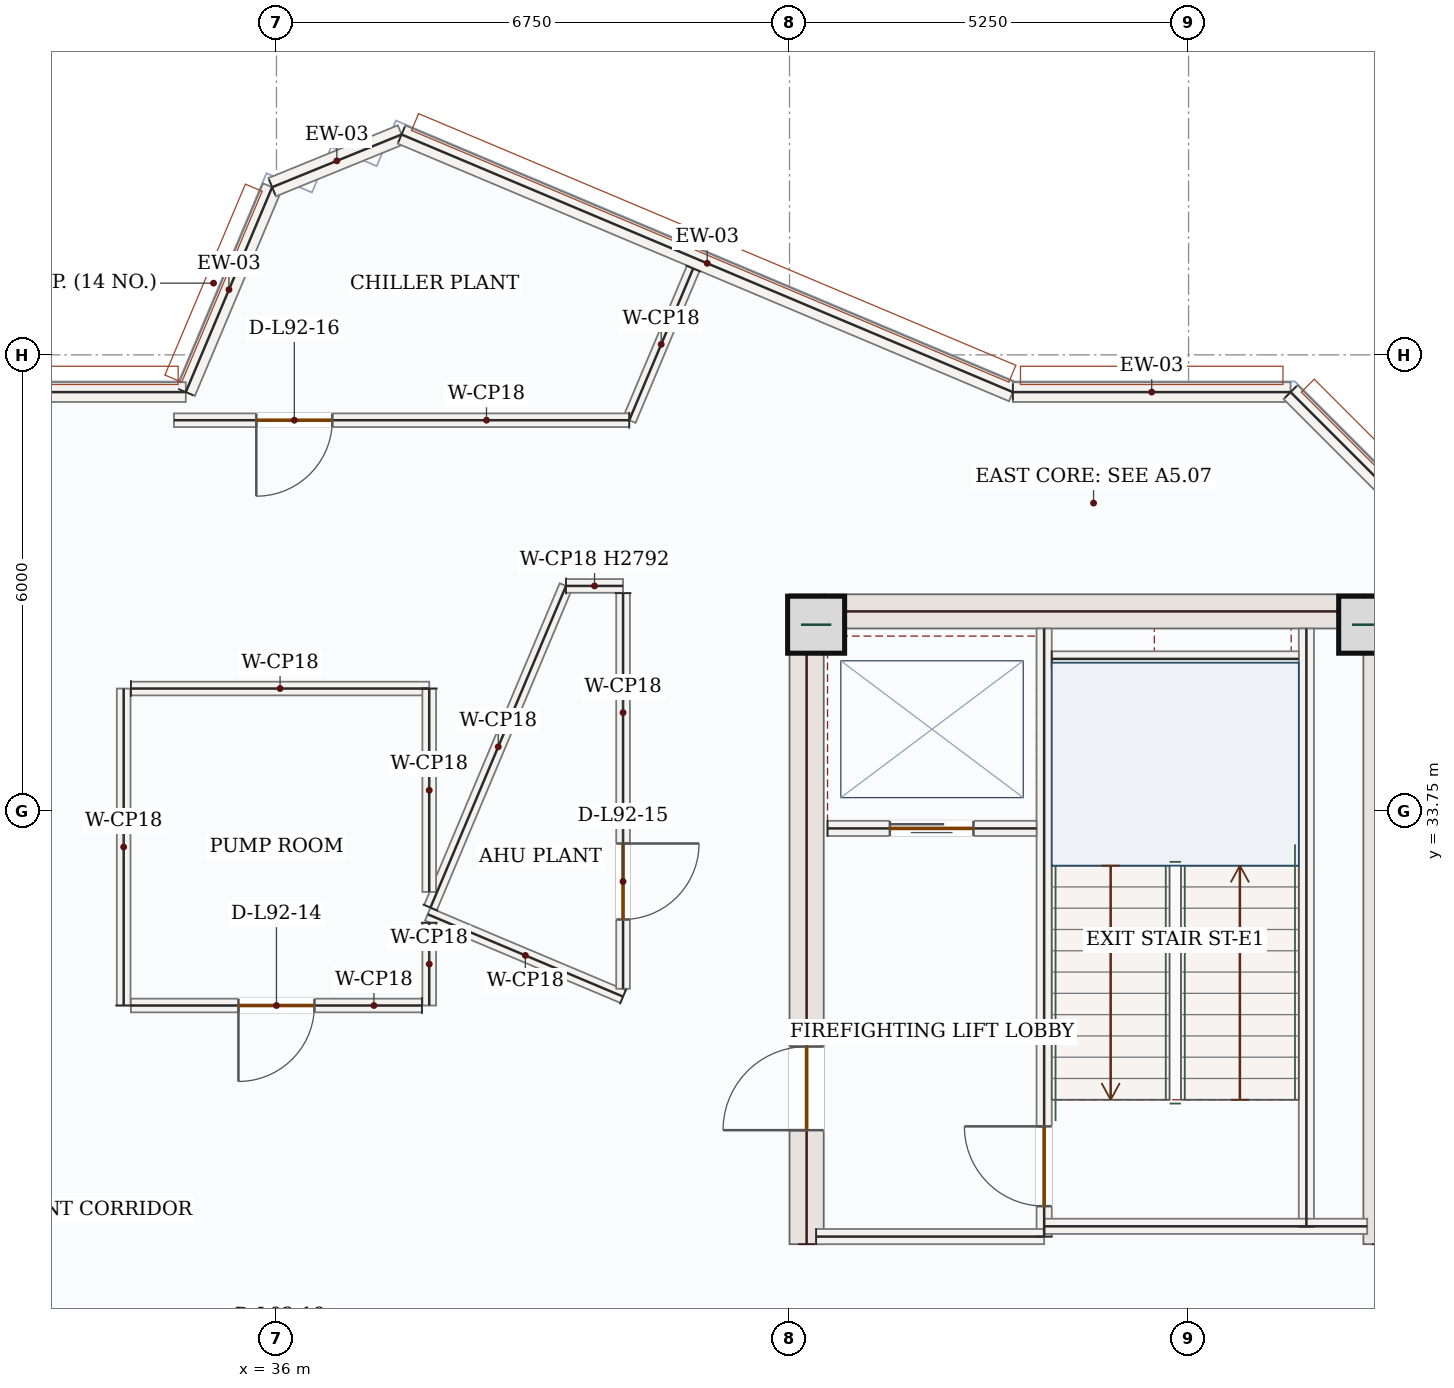
"""IFC4 building model, lengths in metres.
Left out: names, types, materials, properties, quantities, classifications, styles, units other than length and angle.
Written with IfcOpenShell. Run it as: python <this file> out.ifc"""

import sys

from ifc_helpers import new_model, si_unit, direction, frame, frame_2d, origin, origin_2d, place, context, subcontext, project, spatial, rectangle, extrude, source, transform, mapped, element, fill, save


model = new_model("IFC4")
c1 = context("Model", 3, precision=1e-05, world=origin(), true_north=direction((0.0, 1.0)))
c2 = subcontext(c1, "Body", "Model", "MODEL_VIEW")
j1 = project(units=[si_unit("LENGTHUNIT", "METRE"), si_unit("PLANEANGLEUNIT", "RADIAN")], contexts=[c1])
p1 = place(None, origin())
s1 = spatial("IfcSite", under=j1, at=p1, CompositionType="ELEMENT")
p2 = place(p1, origin())
s2 = spatial("IfcBuilding", under=s1, at=p2, CompositionType="ELEMENT")
p3 = place(p2, frame((0.0, 0.0, 379.65)))
s3 = spatial("IfcBuildingStorey", under=s2, at=p3, CompositionType="ELEMENT", Elevation=379.65)
p4 = place(p3, frame((42.975, 28.05, 0.0), z_axis=(0.0, 0.0, 1.0), x_axis=(0.0, 1.0, 0.0)))
e1 = element("IfcWall", 1, at=p4, inside=s3, PredefinedType="SHEAR", context=c2, shape_type="SweptSolid", body=[
    extrude(rectangle(XDim=8.55, YDim=0.45, at=frame_2d((4.275, 0.0))), origin(), (0.0, 0.0, 1.0), 3.95),
])
p5 = place(p4, frame((1.5, 0.0, 0.0)))
e2 = element("IfcOpeningElement", 2, at=p5, cuts=e1, PredefinedType="OPENING", context=c2, shape_type="SweptSolid", body=[
    extrude(rectangle(XDim=1.1, YDim=2.2, at=frame_2d((0.55, 1.1))), frame((0.0, 0.235, 0.0), z_axis=(0.0, -1.0, 0.0), x_axis=(1.0, 0.0, 0.0)), (0.0, 0.0, 1.0), 0.47),
])
m1 = source(origin(), c2, "Body", "SweptSolid", [
    extrude(rectangle(XDim=8.55, YDim=0.45, at=frame_2d((4.275, 0.0))), origin(), (0.0, 0.0, 1.0), 3.95),
])
p6 = place(p3, frame((50.525, 28.05, 0.0), z_axis=(0.0, 0.0, 1.0), x_axis=(0.0, 1.0, 0.0)))
e3 = element("IfcWall", 3, at=p6, inside=s3, PredefinedType="SHEAR", context=c2, shape_type="MappedRepresentation", body=[
    mapped(m1, transform((0.0, 0.0, 0.0), x_axis=(1.0, 0.0, 0.0), y_axis=(0.0, 1.0, 0.0), z_axis=(0.0, 0.0, 1.0), scale=1.0)),
])
m2 = source(origin(), c2, "Body", "SweptSolid", [
    extrude(rectangle(XDim=7.1, YDim=0.45, at=frame_2d((3.55, 0.0))), origin(), (0.0, 0.0, 1.0), 3.95),
])
p7 = place(p3, frame((43.2, 36.375, 0.0), z_axis=(0.0, 0.0, 1.0), x_axis=(1.0, 0.0, 0.0)))
e4 = element("IfcWall", 4, at=p7, inside=s3, PredefinedType="SHEAR", context=c2, shape_type="MappedRepresentation", body=[
    mapped(m2, transform((0.0, 0.0, 0.0), x_axis=(1.0, 0.0, 0.0), y_axis=(0.0, 1.0, 0.0), z_axis=(0.0, 0.0, 1.0), scale=1.0)),
])
m3 = source(origin(), c2, "Body", "SweptSolid", [
    extrude(rectangle(XDim=0.75, YDim=0.75, at=origin_2d()), origin(), (0.0, 0.0, 1.0), 4.2),
])
for number, where, z_axis, x_axis in (
    (5, (43.1, 36.2, 0.0), (0.0, 0.0, 1.0), (1.0, 0.0, 0.0)),
    (6, (50.35, 36.2, 0.0), (0.0, 0.0, 1.0), (1.0, 0.0, 0.0)),
):
    element("IfcColumn", number, at=place(p3, frame(where, z_axis=z_axis, x_axis=x_axis)), inside=s3, PredefinedType="COLUMN", context=c2, shape_type="MappedRepresentation", body=[
        mapped(m3, transform((0.0, 0.0, 0.0), x_axis=(1.0, 0.0, 0.0), y_axis=(0.0, 1.0, 0.0), z_axis=(0.0, 0.0, 1.0), scale=1.0)),
    ])
m4 = source(origin(), c2, "Body", "SweptSolid", [
    extrude(rectangle(XDim=2.925, YDim=0.26, at=frame_2d((1.463, 0.0))), origin(), (0.0, 0.0, 1.0), 3.95),
])
p8 = place(p3, frame((34.807, 39.26, 0.0), z_axis=(0.0, 0.0, 1.0), x_axis=(0.388321883953, 0.921523800259, 0.0)))
e7 = element("IfcWall", 7, at=p8, inside=s3, PredefinedType="SOLIDWALL", context=c2, shape_type="MappedRepresentation", body=[
    mapped(m4, transform((0.0, 0.0, 0.0), x_axis=(1.0, 0.0, 0.0), y_axis=(0.0, 1.0, 0.0), z_axis=(0.0, 0.0, 1.0), scale=1.0)),
])
m5 = source(origin(), c2, "Body", "SweptSolid", [
    extrude(rectangle(XDim=1.839, YDim=0.26, at=frame_2d((0.919, 0.0))), origin(), (0.0, 0.0, 1.0), 3.95),
])
p9 = place(p3, frame((35.943, 41.956, 0.0), z_axis=(0.0, 0.0, 1.0), x_axis=(0.926216039781, 0.376993166586, 0.0)))
e8 = element("IfcWall", 8, at=p9, inside=s3, PredefinedType="SOLIDWALL", context=c2, shape_type="MappedRepresentation", body=[
    mapped(m5, transform((0.0, 0.0, 0.0), x_axis=(1.0, 0.0, 0.0), y_axis=(0.0, 1.0, 0.0), z_axis=(0.0, 0.0, 1.0), scale=1.0)),
])
m6 = source(origin(), c2, "Body", "SweptSolid", [
    extrude(rectangle(XDim=8.727, YDim=0.26, at=frame_2d((4.364, 0.0))), origin(), (0.0, 0.0, 1.0), 3.95),
])
p10 = place(p3, frame((37.646, 42.649, 0.0), z_axis=(0.0, 0.0, 1.0), x_axis=(0.921524227272, -0.38832087061, 0.0)))
e9 = element("IfcWall", 9, at=p10, inside=s3, PredefinedType="SOLIDWALL", context=c2, shape_type="MappedRepresentation", body=[
    mapped(m6, transform((0.0, 0.0, 0.0), x_axis=(1.0, 0.0, 0.0), y_axis=(0.0, 1.0, 0.0), z_axis=(0.0, 0.0, 1.0), scale=1.0)),
])
m7 = source(origin(), c2, "Body", "SweptSolid", [
    extrude(rectangle(XDim=3.654, YDim=0.26, at=frame_2d((1.827, 0.0))), origin(), (0.0, 0.0, 1.0), 3.95),
])
p11 = place(p3, frame((45.688, 39.26, 0.0), z_axis=(0.0, 0.0, 1.0), x_axis=(1.0, 0.0, 0.0)))
e10 = element("IfcWall", 10, at=p11, inside=s3, PredefinedType="SOLIDWALL", context=c2, shape_type="MappedRepresentation", body=[
    mapped(m7, transform((0.0, 0.0, 0.0), x_axis=(1.0, 0.0, 0.0), y_axis=(0.0, 1.0, 0.0), z_axis=(0.0, 0.0, 1.0), scale=1.0)),
])
m8 = source(origin(), c2, "Body", "SweptSolid", [
    extrude(rectangle(XDim=5.258, YDim=0.26, at=frame_2d((2.629, 0.0))), origin(), (0.0, 0.0, 1.0), 3.95),
])
p12 = place(p3, frame((49.342, 39.26, 0.0), z_axis=(0.0, 0.0, 1.0), x_axis=(0.707106781187, -0.707106781187, 0.0)))
e11 = element("IfcWall", 11, at=p12, inside=s3, PredefinedType="SOLIDWALL", context=c2, shape_type="MappedRepresentation", body=[
    mapped(m8, transform((0.0, 0.0, 0.0), x_axis=(1.0, 0.0, 0.0), y_axis=(0.0, 1.0, 0.0), z_axis=(0.0, 0.0, 1.0), scale=1.0)),
])
m9 = source(origin(), c2, "Body", "SweptSolid", [
    extrude(rectangle(XDim=12.149, YDim=0.26, at=frame_2d((6.075, 0.0))), origin(), (0.0, 0.0, 1.0), 3.95),
])
p13 = place(p3, frame((22.658, 39.26, 0.0), z_axis=(0.0, 0.0, 1.0), x_axis=(1.0, 0.0, 0.0)))
e12 = element("IfcWall", 12, at=p13, inside=s3, PredefinedType="SOLIDWALL", context=c2, shape_type="MappedRepresentation", body=[
    mapped(m9, transform((0.0, 0.0, 0.0), x_axis=(1.0, 0.0, 0.0), y_axis=(0.0, 1.0, 0.0), z_axis=(0.0, 0.0, 1.0), scale=1.0)),
])
m10 = source(origin(), c2, "Body", "SweptSolid", [
    extrude(rectangle(XDim=7.87, YDim=0.2, at=frame_2d((3.935, 0.0))), origin(), (0.0, 0.0, 1.0), 3.95),
])
p14 = place(p3, frame((49.55, 28.28, 0.0), z_axis=(0.0, 0.0, 1.0), x_axis=(0.0, 1.0, 0.0)))
e13 = element("IfcWall", 13, at=p14, inside=s3, PredefinedType="SOLIDWALL", context=c2, shape_type="MappedRepresentation", body=[
    mapped(m10, transform((0.0, 0.0, 0.0), x_axis=(1.0, 0.0, 0.0), y_axis=(0.0, 1.0, 0.0), z_axis=(0.0, 0.0, 1.0), scale=1.0)),
])
p15 = place(p3, frame((46.1, 28.15, 0.0), z_axis=(0.0, 0.0, 1.0), x_axis=(0.0, 1.0, 0.0)))
e14 = element("IfcWall", 14, at=p15, inside=s3, PredefinedType="SOLIDWALL", context=c2, shape_type="SweptSolid", body=[
    extrude(rectangle(XDim=8.0, YDim=0.2, at=frame_2d((4.0, 0.0))), origin(), (0.0, 0.0, 1.0), 3.95),
])
p16 = place(p15, frame((0.4, 0.0, 0.0)))
e15 = element("IfcOpeningElement", 15, at=p16, cuts=e14, PredefinedType="OPENING", context=c2, shape_type="SweptSolid", body=[
    extrude(rectangle(XDim=1.05, YDim=2.15, at=frame_2d((0.525, 1.075))), frame((0.0, 0.11, 0.0), z_axis=(0.0, -1.0, 0.0), x_axis=(1.0, 0.0, 0.0)), (0.0, 0.0, 1.0), 0.22),
])
m11 = source(origin(), c2, "Body", "SweptSolid", [
    extrude(rectangle(XDim=3.0, YDim=0.2, at=frame_2d((1.5, 0.0))), origin(), (0.0, 0.0, 1.0), 3.95),
])
p17 = place(p3, frame((43.1, 28.15, 0.0), z_axis=(0.0, 0.0, 1.0), x_axis=(1.0, 0.0, 0.0)))
e16 = element("IfcWall", 16, at=p17, inside=s3, PredefinedType="SOLIDWALL", context=c2, shape_type="MappedRepresentation", body=[
    mapped(m11, transform((0.0, 0.0, 0.0), x_axis=(1.0, 0.0, 0.0), y_axis=(0.0, 1.0, 0.0), z_axis=(0.0, 0.0, 1.0), scale=1.0)),
])
m12 = source(origin(), c2, "Body", "SweptSolid", [
    extrude(rectangle(XDim=4.25, YDim=0.2, at=frame_2d((2.125, 0.0))), origin(), (0.0, 0.0, 1.0), 3.95),
])
p18 = place(p3, frame((46.1, 28.285, 0.0), z_axis=(0.0, 0.0, 1.0), x_axis=(1.0, 0.0, 0.0)))
e17 = element("IfcWall", 17, at=p18, inside=s3, PredefinedType="SOLIDWALL", context=c2, shape_type="MappedRepresentation", body=[
    mapped(m12, transform((0.0, 0.0, 0.0), x_axis=(1.0, 0.0, 0.0), y_axis=(0.0, 1.0, 0.0), z_axis=(0.0, 0.0, 1.0), scale=1.0)),
])
m13 = source(origin(), c2, "Body", "SweptSolid", [
    extrude(rectangle(XDim=3.25, YDim=0.2, at=frame_2d((1.625, 0.0))), origin(), (0.0, 0.0, 1.0), 3.95),
])
p19 = place(p3, frame((46.2, 35.75, 0.0), z_axis=(0.0, 0.0, 1.0), x_axis=(1.0, 0.0, 0.0)))
e18 = element("IfcWall", 18, at=p19, inside=s3, PredefinedType="SOLIDWALL", context=c2, shape_type="MappedRepresentation", body=[
    mapped(m13, transform((0.0, 0.0, 0.0), x_axis=(1.0, 0.0, 0.0), y_axis=(0.0, 1.0, 0.0), z_axis=(0.0, 0.0, 1.0), scale=1.0)),
])
p20 = place(p3, frame((43.25, 33.52, 0.0), z_axis=(0.0, 0.0, 1.0), x_axis=(1.0, 0.0, 0.0)))
e19 = element("IfcWall", 19, at=p20, inside=s3, PredefinedType="SOLIDWALL", context=c2, shape_type="SweptSolid", body=[
    extrude(rectangle(XDim=2.75, YDim=0.2, at=frame_2d((1.375, 0.0))), origin(), (0.0, 0.0, 1.0), 3.95),
])
p21 = place(p20, frame((0.82, 0.0, 0.0)))
e20 = element("IfcOpeningElement", 20, at=p21, cuts=e19, PredefinedType="OPENING", context=c2, shape_type="SweptSolid", body=[
    extrude(rectangle(XDim=1.1, YDim=2.15, at=frame_2d((0.55, 1.075))), frame((0.0, 0.11, 0.0), z_axis=(0.0, -1.0, 0.0), x_axis=(1.0, 0.0, 0.0)), (0.0, 0.0, 1.0), 0.22),
])
m14 = source(origin(), c2, "Body", "SweptSolid", [
    extrude(rectangle(XDim=2.789, YDim=0.18, at=frame_2d((1.395, 0.0))), origin(), (0.0, 0.0, 1.0), 3.95),
])
p22 = place(p3, frame((40.56, 31.307, 0.0), z_axis=(0.0, 0.0, 1.0), x_axis=(-0.921549681246, 0.388260460253, 0.0)))
e21 = element("IfcWall", 21, at=p22, inside=s3, PredefinedType="PARTITIONING", context=c2, shape_type="MappedRepresentation", body=[
    mapped(m14, transform((0.0, 0.0, 0.0), x_axis=(1.0, 0.0, 0.0), y_axis=(0.0, 1.0, 0.0), z_axis=(0.0, 0.0, 1.0), scale=1.0)),
])
m15 = source(origin(), c2, "Body", "SweptSolid", [
    extrude(rectangle(XDim=4.592, YDim=0.18, at=frame_2d((2.296, 0.0))), origin(), (0.0, 0.0, 1.0), 3.95),
])
p23 = place(p3, frame((38.026, 32.478, 0.0), z_axis=(0.0, 0.0, 1.0), x_axis=(0.388304163806, 0.92153126717, 0.0)))
e22 = element("IfcWall", 22, at=p23, inside=s3, PredefinedType="PARTITIONING", context=c2, shape_type="MappedRepresentation", body=[
    mapped(m15, transform((0.0, 0.0, 0.0), x_axis=(1.0, 0.0, 0.0), y_axis=(0.0, 1.0, 0.0), z_axis=(0.0, 0.0, 1.0), scale=1.0)),
])
m16 = source(origin(), c2, "Body", "SweptSolid", [
    extrude(rectangle(XDim=0.75, YDim=0.18, at=frame_2d((0.375, 0.0))), origin(), (0.0, 0.0, 1.0), 2.792),
])
p24 = place(p3, frame((39.81, 36.71, 0.0), z_axis=(0.0, 0.0, 1.0), x_axis=(1.0, 0.0, 0.0)))
e23 = element("IfcWall", 23, at=p24, inside=s3, PredefinedType="PARTITIONING", context=c2, shape_type="MappedRepresentation", body=[
    mapped(m16, transform((0.0, 0.0, 0.0), x_axis=(1.0, 0.0, 0.0), y_axis=(0.0, 1.0, 0.0), z_axis=(0.0, 0.0, 1.0), scale=1.0)),
])
p25 = place(p3, frame((40.56, 36.615, 0.0), z_axis=(0.0, 0.0, 1.0), x_axis=(0.0, -1.0, 0.0)))
e24 = element("IfcWall", 24, at=p25, inside=s3, PredefinedType="PARTITIONING", context=c2, shape_type="SweptSolid", body=[
    extrude(rectangle(XDim=5.205, YDim=0.18, at=frame_2d((2.602, 0.0))), origin(), (0.0, 0.0, 1.0), 3.95),
])
p26 = place(p25, frame((3.294, 0.0, 0.0)))
e25 = element("IfcOpeningElement", 25, at=p26, cuts=e24, PredefinedType="OPENING", context=c2, shape_type="SweptSolid", body=[
    extrude(rectangle(XDim=1.0, YDim=2.15, at=frame_2d((0.5, 1.075))), frame((0.0, 0.1, 0.0), z_axis=(0.0, -1.0, 0.0), x_axis=(1.0, 0.0, 0.0)), (0.0, 0.0, 1.0), 0.2),
])
m17 = source(origin(), c2, "Body", "SweptSolid", [
    extrude(rectangle(XDim=4.17, YDim=0.18, at=frame_2d((2.085, 0.0))), origin(), (0.0, 0.0, 1.0), 3.95),
])
p27 = place(p3, frame((33.99, 31.19, 0.0), z_axis=(0.0, 0.0, 1.0), x_axis=(0.0, 1.0, 0.0)))
e26 = element("IfcWall", 26, at=p27, inside=s3, PredefinedType="PARTITIONING", context=c2, shape_type="MappedRepresentation", body=[
    mapped(m17, transform((0.0, 0.0, 0.0), x_axis=(1.0, 0.0, 0.0), y_axis=(0.0, 1.0, 0.0), z_axis=(0.0, 0.0, 1.0), scale=1.0)),
])
m18 = source(origin(), c2, "Body", "SweptSolid", [
    extrude(rectangle(XDim=3.925, YDim=0.18, at=frame_2d((1.962, 0.0))), origin(), (0.0, 0.0, 1.0), 3.95),
])
p28 = place(p3, frame((34.085, 35.36, 0.0), z_axis=(0.0, 0.0, 1.0), x_axis=(1.0, 0.0, 0.0)))
e27 = element("IfcWall", 27, at=p28, inside=s3, PredefinedType="PARTITIONING", context=c2, shape_type="MappedRepresentation", body=[
    mapped(m18, transform((0.0, 0.0, 0.0), x_axis=(1.0, 0.0, 0.0), y_axis=(0.0, 1.0, 0.0), z_axis=(0.0, 0.0, 1.0), scale=1.0)),
])
m19 = source(origin(), c2, "Body", "SweptSolid", [
    extrude(rectangle(XDim=2.676, YDim=0.18, at=frame_2d((1.338, 0.0))), origin(), (0.0, 0.0, 1.0), 3.95),
])
p29 = place(p3, frame((38.01, 35.36, 0.0), z_axis=(0.0, 0.0, 1.0), x_axis=(0.0, -1.0, 0.0)))
e28 = element("IfcWall", 28, at=p29, inside=s3, PredefinedType="PARTITIONING", context=c2, shape_type="MappedRepresentation", body=[
    mapped(m19, transform((0.0, 0.0, 0.0), x_axis=(1.0, 0.0, 0.0), y_axis=(0.0, 1.0, 0.0), z_axis=(0.0, 0.0, 1.0), scale=1.0)),
])
m20 = source(origin(), c2, "Body", "SweptSolid", [
    extrude(rectangle(XDim=1.089, YDim=0.18, at=frame_2d((0.544, 0.0))), origin(), (0.0, 0.0, 1.0), 3.95),
])
p30 = place(p3, frame((38.01, 32.279, 0.0), z_axis=(0.0, 0.0, 1.0), x_axis=(0.0, -1.0, 0.0)))
e29 = element("IfcWall", 29, at=p30, inside=s3, PredefinedType="PARTITIONING", context=c2, shape_type="MappedRepresentation", body=[
    mapped(m20, transform((0.0, 0.0, 0.0), x_axis=(1.0, 0.0, 0.0), y_axis=(0.0, 1.0, 0.0), z_axis=(0.0, 0.0, 1.0), scale=1.0)),
])
p31 = place(p3, frame((37.915, 31.19, 0.0), z_axis=(0.0, 0.0, 1.0), x_axis=(-1.0, 0.0, 0.0)))
e30 = element("IfcWall", 30, at=p31, inside=s3, PredefinedType="PARTITIONING", context=c2, shape_type="SweptSolid", body=[
    extrude(rectangle(XDim=3.83, YDim=0.18, at=frame_2d((1.915, 0.0))), origin(), (0.0, 0.0, 1.0), 3.95),
])
p32 = place(p31, frame((1.415, 0.0, 0.0)))
e31 = element("IfcOpeningElement", 31, at=p32, cuts=e30, PredefinedType="OPENING", context=c2, shape_type="SweptSolid", body=[
    extrude(rectangle(XDim=1.0, YDim=2.15, at=frame_2d((0.5, 1.075))), frame((0.0, 0.1, 0.0), z_axis=(0.0, -1.0, 0.0), x_axis=(1.0, 0.0, 0.0)), (0.0, 0.0, 1.0), 0.2),
])
m21 = source(origin(), c2, "Body", "SweptSolid", [
    extrude(rectangle(XDim=2.166, YDim=0.18, at=frame_2d((1.083, 0.0))), origin(), (0.0, 0.0, 1.0), 3.95),
])
p33 = place(p3, frame((41.482, 40.886, 0.0), z_axis=(0.0, 0.0, 1.0), x_axis=(-0.388334150913, -0.921518630976, 0.0)))
e32 = element("IfcWall", 32, at=p33, inside=s3, PredefinedType="PARTITIONING", context=c2, shape_type="MappedRepresentation", body=[
    mapped(m21, transform((0.0, 0.0, 0.0), x_axis=(1.0, 0.0, 0.0), y_axis=(0.0, 1.0, 0.0), z_axis=(0.0, 0.0, 1.0), scale=1.0)),
])
p34 = place(p3, frame((40.641, 38.89, 0.0), z_axis=(0.0, 0.0, 1.0), x_axis=(-1.0, 0.0, 0.0)))
e33 = element("IfcWall", 33, at=p34, inside=s3, PredefinedType="PARTITIONING", context=c2, shape_type="SweptSolid", body=[
    extrude(rectangle(XDim=5.99, YDim=0.18, at=frame_2d((2.995, 0.0))), origin(), (0.0, 0.0, 1.0), 3.95),
])
p35 = place(p34, frame((3.906, 0.0, 0.0)))
e34 = element("IfcOpeningElement", 34, at=p35, cuts=e33, PredefinedType="OPENING", context=c2, shape_type="SweptSolid", body=[
    extrude(rectangle(XDim=1.0, YDim=2.15, at=frame_2d((0.5, 1.075))), frame((0.0, 0.1, 0.0), z_axis=(0.0, -1.0, 0.0), x_axis=(1.0, 0.0, 0.0)), (0.0, 0.0, 1.0), 0.2),
])
m22 = source(origin(), c2, "Body", "SweptSolid", [
    extrude(rectangle(XDim=1.05, YDim=2.15, at=frame_2d((0.525, 1.075))), frame((0.0, 0.025, 0.0), z_axis=(0.0, -1.0, 0.0), x_axis=(1.0, 0.0, 0.0)), (0.0, 0.0, 1.0), 0.05),
])
p36 = place(p16, origin())
e35 = element("IfcDoor", 35, at=p36, inside=s3, OperationType="SINGLE_SWING_RIGHT", PredefinedType="DOOR", context=c2, shape_type="MappedRepresentation", body=[
    mapped(m22, transform((0.0, 0.0, 0.0), x_axis=(1.0, 0.0, 0.0), y_axis=(0.0, 1.0, 0.0), z_axis=(0.0, 0.0, 1.0), scale=1.0)),
])
fill(e15, e35)
m23 = source(origin(), c2, "Body", "SweptSolid", [
    extrude(rectangle(XDim=1.1, YDim=2.15, at=frame_2d((0.55, 1.075))), frame((0.0, 0.025, 0.0), z_axis=(0.0, -1.0, 0.0), x_axis=(1.0, 0.0, 0.0)), (0.0, 0.0, 1.0), 0.05),
])
p37 = place(p21, origin())
e36 = element("IfcDoor", 36, at=p37, inside=s3, OperationType="DOUBLE_DOOR_SLIDING", PredefinedType="DOOR", context=c2, shape_type="MappedRepresentation", body=[
    mapped(m23, transform((0.0, 0.0, 0.0), x_axis=(1.0, 0.0, 0.0), y_axis=(0.0, 1.0, 0.0), z_axis=(0.0, 0.0, 1.0), scale=1.0)),
])
fill(e20, e36)
m24 = source(origin(), c2, "Body", "SweptSolid", [
    extrude(rectangle(XDim=1.1, YDim=2.2, at=frame_2d((0.55, 1.1))), frame((0.0, 0.025, 0.0), z_axis=(0.0, -1.0, 0.0), x_axis=(1.0, 0.0, 0.0)), (0.0, 0.0, 1.0), 0.05),
])
p38 = place(p5, origin())
e37 = element("IfcDoor", 37, at=p38, inside=s3, OperationType="SINGLE_SWING_LEFT", PredefinedType="DOOR", context=c2, shape_type="MappedRepresentation", body=[
    mapped(m24, transform((0.0, 0.0, 0.0), x_axis=(1.0, 0.0, 0.0), y_axis=(0.0, 1.0, 0.0), z_axis=(0.0, 0.0, 1.0), scale=1.0)),
])
fill(e2, e37)
m25 = source(origin(), c2, "Body", "SweptSolid", [
    extrude(rectangle(XDim=1.0, YDim=2.15, at=frame_2d((0.5, 1.075))), frame((0.0, 0.025, 0.0), z_axis=(0.0, -1.0, 0.0), x_axis=(1.0, 0.0, 0.0)), (0.0, 0.0, 1.0), 0.05),
])
p39 = place(p32, origin())
e38 = element("IfcDoor", 38, at=p39, inside=s3, OperationType="SINGLE_SWING_RIGHT", PredefinedType="DOOR", context=c2, shape_type="MappedRepresentation", body=[
    mapped(m25, transform((0.0, 0.0, 0.0), x_axis=(1.0, 0.0, 0.0), y_axis=(0.0, 1.0, 0.0), z_axis=(0.0, 0.0, 1.0), scale=1.0)),
])
fill(e31, e38)
p40 = place(p26, origin())
e39 = element("IfcDoor", 39, at=p40, inside=s3, OperationType="SINGLE_SWING_LEFT", PredefinedType="DOOR", context=c2, shape_type="MappedRepresentation", body=[
    mapped(m25, transform((0.0, 0.0, 0.0), x_axis=(1.0, 0.0, 0.0), y_axis=(0.0, 1.0, 0.0), z_axis=(0.0, 0.0, 1.0), scale=1.0)),
])
fill(e25, e39)
p41 = place(p35, origin())
e40 = element("IfcDoor", 40, at=p41, inside=s3, OperationType="SINGLE_SWING_RIGHT", PredefinedType="DOOR", context=c2, shape_type="MappedRepresentation", body=[
    mapped(m25, transform((0.0, 0.0, 0.0), x_axis=(1.0, 0.0, 0.0), y_axis=(0.0, 1.0, 0.0), z_axis=(0.0, 0.0, 1.0), scale=1.0)),
])
fill(e34, e40)
save(model, sys.argv[1])
